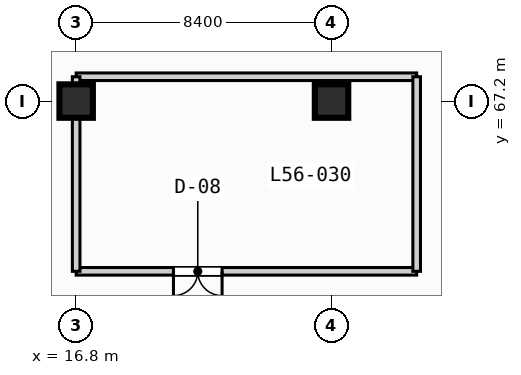
"""IFC4 building model, lengths in metres.
Left out: names, types, materials, properties, quantities, classifications, styles, units other than length and angle.
Written with IfcOpenShell. Run it as: python <this file> out.ifc"""

import sys

from ifc_helpers import new_model, si_unit, direction, frame, frame_2d, origin, origin_2d, place, context, subcontext, project, spatial, rectangle, extrude, element, fill, save


model = new_model("IFC4")
c1 = context("Model", 3, precision=1e-05, world=origin(), true_north=direction((0.0, 1.0)))
c2 = subcontext(c1, "Body", "Model", "MODEL_VIEW")
j1 = project(units=[si_unit("LENGTHUNIT", "METRE"), si_unit("PLANEANGLEUNIT", "RADIAN")], contexts=[c1])
p1 = place(None, origin())
s1 = spatial("IfcSite", under=j1, at=p1, CompositionType="ELEMENT")
p2 = place(p1, origin())
s2 = spatial("IfcBuilding", under=s1, at=p2, CompositionType="ELEMENT")
p3 = place(p2, frame((0.0, 0.0, 228.2)))
s3 = spatial("IfcBuildingStorey", under=s2, at=p3, CompositionType="ELEMENT", Elevation=228.2)
for number, where, z_axis, x_axis in (
    (1, (16.8, 67.2, 0.0), (0.0, 0.0, 1.0), (1.0, 0.0, 0.0)),
    (2, (25.2, 67.2, 0.0), (0.0, 0.0, 1.0), (1.0, 0.0, 0.0)),
):
    element("IfcColumn", number, at=place(p3, frame(where, z_axis=z_axis, x_axis=x_axis)), inside=s3, PredefinedType="COLUMN", context=c2, shape_type="SweptSolid", body=[
        extrude(rectangle(XDim=1.1, YDim=1.1, at=origin_2d()), origin(), (0.0, 0.0, 1.0), 6.0),
    ])
p4 = place(p3, frame((16.8, 61.6, 0.0), z_axis=(0.0, 0.0, 1.0), x_axis=(1.0, 0.0, 0.0)))
e3 = element("IfcWall", 3, at=p4, inside=s3, PredefinedType="SOLIDWALL", context=c2, shape_type="SweptSolid", body=[
    extrude(rectangle(XDim=11.2, YDim=0.25, at=frame_2d((5.6, 0.0))), origin(), (0.0, 0.0, 1.0), 5.77),
])
p5 = place(p4, frame((3.2, 0.0, 0.0)))
e4 = element("IfcOpeningElement", 4, at=p5, cuts=e3, PredefinedType="OPENING", context=c2, shape_type="SweptSolid", body=[
    extrude(rectangle(XDim=1.6, YDim=2.2, at=frame_2d((0.8, 1.1))), frame((0.0, 0.135, 0.0), z_axis=(0.0, -1.0, 0.0), x_axis=(1.0, 0.0, 0.0)), (0.0, 0.0, 1.0), 0.27),
])
p6 = place(p3, frame((16.8, 68.0, 0.0), z_axis=(0.0, 0.0, 1.0), x_axis=(1.0, 0.0, 0.0)))
e5 = element("IfcWall", 5, at=p6, inside=s3, PredefinedType="SOLIDWALL", context=c2, shape_type="SweptSolid", body=[
    extrude(rectangle(XDim=11.2, YDim=0.25, at=frame_2d((5.6, 0.0))), origin(), (0.0, 0.0, 1.0), 5.77),
])
p7 = place(p3, frame((16.8, 61.6, 0.0), z_axis=(0.0, 0.0, 1.0), x_axis=(0.0, 1.0, 0.0)))
e6 = element("IfcWall", 6, at=p7, inside=s3, PredefinedType="SOLIDWALL", context=c2, shape_type="SweptSolid", body=[
    extrude(rectangle(XDim=6.4, YDim=0.25, at=frame_2d((3.2, 0.0))), origin(), (0.0, 0.0, 1.0), 5.12),
])
p8 = place(p3, frame((28.0, 61.6, 0.0), z_axis=(0.0, 0.0, 1.0), x_axis=(0.0, 1.0, 0.0)))
e7 = element("IfcWall", 7, at=p8, inside=s3, PredefinedType="SOLIDWALL", context=c2, shape_type="SweptSolid", body=[
    extrude(rectangle(XDim=6.4, YDim=0.25, at=frame_2d((3.2, 0.0))), origin(), (0.0, 0.0, 1.0), 5.77),
])
p9 = place(p5, origin())
e8 = element("IfcDoor", 8, at=p9, inside=s3, OperationType="SINGLE_SWING_RIGHT", PredefinedType="DOOR", context=c2, shape_type="SweptSolid", body=[
    extrude(rectangle(XDim=1.6, YDim=2.2, at=frame_2d((0.8, 1.1))), frame((0.0, 0.025, 0.0), z_axis=(0.0, -1.0, 0.0), x_axis=(1.0, 0.0, 0.0)), (0.0, 0.0, 1.0), 0.05),
])
fill(e4, e8)
save(model, sys.argv[1])
